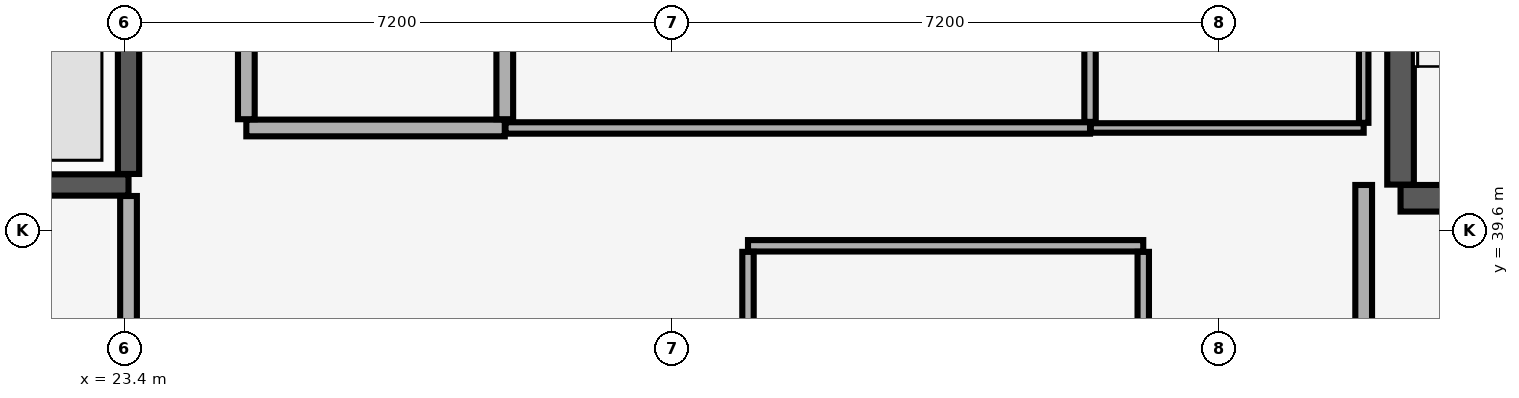
"""IFC4 building model, lengths in metres.
Left out: names, types, materials, properties, quantities, classifications, styles, units other than length and angle.
Written with IfcOpenShell. Run it as: python <this file> out.ifc"""

import sys

from ifc_helpers import new_model, si_unit, direction, frame, frame_2d, origin, place, context, subcontext, project, spatial, rectangle, extrude, element, fill, save


model = new_model("IFC4")
c1 = context("Model", 3, precision=1e-05, world=origin(), true_north=direction((0.0, 1.0)))
c2 = subcontext(c1, "Body", "Model", "MODEL_VIEW")
j1 = project(units=[si_unit("LENGTHUNIT", "METRE"), si_unit("PLANEANGLEUNIT", "RADIAN")], contexts=[c1])
p1 = place(None, origin())
s1 = spatial("IfcSite", under=j1, at=p1, CompositionType="ELEMENT")
p2 = place(p1, origin())
s2 = spatial("IfcBuilding", under=s1, at=p2, CompositionType="ELEMENT")
p3 = place(p2, frame((0.0, 0.0, 224.35)))
s3 = spatial("IfcBuildingStorey", under=s2, at=p3, CompositionType="ELEMENT", Elevation=224.35)
p4 = place(p3, frame((40.185, 40.025, 0.0), z_axis=(0.0, 0.0, 1.0), x_axis=(1.0, 0.0, 0.0)))
e1 = element("IfcWall", 1, at=p4, inside=s3, PredefinedType="SHEAR", context=c2, shape_type="SweptSolid", body=[
    extrude(rectangle(XDim=3.63, YDim=0.35, at=frame_2d((1.815, 0.0))), origin(), (0.0, 0.0, 1.0), 4.52),
])
p5 = place(p4, frame((1.24, 0.0, 0.0)))
e2 = element("IfcOpeningElement", 2, at=p5, cuts=e1, PredefinedType="OPENING", context=c2, shape_type="SweptSolid", body=[
    extrude(rectangle(XDim=1.15, YDim=2.15, at=frame_2d((0.575, 1.075))), frame((0.0, 0.185, 0.0), z_axis=(0.0, -1.0, 0.0), x_axis=(1.0, 0.0, 0.0)), (0.0, 0.0, 1.0), 0.37),
])
p6 = place(p3, frame((40.185, 40.205, 0.0), z_axis=(0.0, 0.0, 1.0), x_axis=(0.0, 1.0, 0.0)))
e3 = element("IfcWall", 3, at=p6, inside=s3, PredefinedType="SHEAR", context=c2, shape_type="SweptSolid", body=[
    extrude(rectangle(XDim=8.09, YDim=0.35, at=frame_2d((4.045, 0.0))), origin(), (0.0, 0.0, 1.0), 4.52),
])
p7 = place(p3, frame((21.035, 40.2, 0.0), z_axis=(0.0, 0.0, 1.0), x_axis=(1.0, 0.0, 0.0)))
e4 = element("IfcWall", 4, at=p7, inside=s3, PredefinedType="SHEAR", context=c2, shape_type="SweptSolid", body=[
    extrude(rectangle(XDim=2.415, YDim=0.28, at=frame_2d((1.208, 0.0))), origin(), (0.0, 0.0, 1.0), 4.52),
])
p8 = place(p7, frame((0.54, 0.0, 0.0)))
e5 = element("IfcOpeningElement", 5, at=p8, cuts=e4, PredefinedType="OPENING", context=c2, shape_type="SweptSolid", body=[
    extrude(rectangle(XDim=1.3, YDim=2.3, at=frame_2d((0.65, 1.15))), frame((0.0, 0.15, 0.0), z_axis=(0.0, -1.0, 0.0), x_axis=(1.0, 0.0, 0.0)), (0.0, 0.0, 1.0), 0.3),
])
p9 = place(p3, frame((23.45, 40.345, 0.0), z_axis=(0.0, 0.0, 1.0), x_axis=(0.0, 1.0, 0.0)))
e6 = element("IfcWall", 6, at=p9, inside=s3, PredefinedType="SHEAR", context=c2, shape_type="SweptSolid", body=[
    extrude(rectangle(XDim=2.81, YDim=0.28, at=frame_2d((1.405, 0.0))), origin(), (0.0, 0.0, 1.0), 4.52),
])
p10 = place(p3, frame((23.45, 34.415, 0.0), z_axis=(0.0, 0.0, 1.0), x_axis=(0.0, 1.0, 0.0)))
e7 = element("IfcWall", 7, at=p10, inside=s3, PredefinedType="PARTITIONING", context=c2, shape_type="SweptSolid", body=[
    extrude(rectangle(XDim=5.64, YDim=0.22, at=frame_2d((2.82, 0.0))), origin(), (0.0, 0.0, 1.0), 4.52),
])
p11 = place(p3, frame((39.7, 34.415, 0.0), z_axis=(0.0, 0.0, 1.0), x_axis=(0.0, 1.0, 0.0)))
e8 = element("IfcWall", 8, at=p11, inside=s3, PredefinedType="PARTITIONING", context=c2, shape_type="SweptSolid", body=[
    extrude(rectangle(XDim=5.785, YDim=0.22, at=frame_2d((2.893, 0.0))), origin(), (0.0, 0.0, 1.0), 4.52),
])
p12 = place(p3, frame((31.6, 39.4, 0.0), z_axis=(0.0, 0.0, 1.0), x_axis=(1.0, 0.0, 0.0)))
e9 = element("IfcWall", 9, at=p12, inside=s3, PredefinedType="PARTITIONING", context=c2, shape_type="SweptSolid", body=[
    extrude(rectangle(XDim=5.2, YDim=0.15, at=frame_2d((2.6, 0.0))), origin(), (0.0, 0.0, 1.0), 4.52),
])
for number, where, z_axis, x_axis in (
    (10, (31.6, 34.38, 0.0), (0.0, 0.0, 1.0), (0.0, 1.0, 0.0)),
    (11, (36.8, 34.38, 0.0), (0.0, 0.0, 1.0), (0.0, 1.0, 0.0)),
):
    element("IfcWall", number, at=place(p3, frame(where, z_axis=z_axis, x_axis=x_axis)), inside=s3, PredefinedType="PARTITIONING", context=c2, shape_type="SweptSolid", body=[
        extrude(rectangle(XDim=4.94, YDim=0.15, at=frame_2d((2.47, 0.0))), origin(), (0.0, 0.0, 1.0), 4.52),
    ])
p13 = place(p3, frame((25.0, 40.95, 0.0), z_axis=(0.0, 0.0, 1.0), x_axis=(1.0, 0.0, 0.0)))
e12 = element("IfcWall", 12, at=p13, inside=s3, PredefinedType="PARTITIONING", context=c2, shape_type="SweptSolid", body=[
    extrude(rectangle(XDim=3.4, YDim=0.22, at=frame_2d((1.7, 0.0))), origin(), (0.0, 0.0, 1.0), 4.52),
])
p14 = place(p13, frame((1.275, 0.0, 0.0)))
e13 = element("IfcOpeningElement", 13, at=p14, cuts=e12, PredefinedType="OPENING", context=c2, shape_type="SweptSolid", body=[
    extrude(rectangle(XDim=0.85, YDim=2.1, at=frame_2d((0.425, 1.05))), frame((0.0, 0.12, 0.0), z_axis=(0.0, -1.0, 0.0), x_axis=(1.0, 0.0, 0.0)), (0.0, 0.0, 1.0), 0.24),
])
for number, where, z_axis, x_axis in (
    (14, (25.0, 41.065, 0.0), (0.0, 0.0, 1.0), (0.0, 1.0, 0.0)),
    (15, (28.4, 41.065, 0.0), (0.0, 0.0, 1.0), (0.0, 1.0, 0.0)),
):
    element("IfcWall", number, at=place(p3, frame(where, z_axis=z_axis, x_axis=x_axis)), inside=s3, PredefinedType="PARTITIONING", context=c2, shape_type="SweptSolid", body=[
        extrude(rectangle(XDim=7.785, YDim=0.22, at=frame_2d((3.893, 0.0))), origin(), (0.0, 0.0, 1.0), 4.52),
    ])
p15 = place(p3, frame((28.41, 40.95, 0.0), z_axis=(0.0, 0.0, 1.0), x_axis=(1.0, 0.0, 0.0)))
e16 = element("IfcWall", 16, at=p15, inside=s3, PredefinedType="PARTITIONING", context=c2, shape_type="SweptSolid", body=[
    extrude(rectangle(XDim=7.69, YDim=0.15, at=frame_2d((3.845, 0.0))), origin(), (0.0, 0.0, 1.0), 4.52),
])
p16 = place(p15, frame((3.415, 0.0, 0.0)))
e17 = element("IfcOpeningElement", 17, at=p16, cuts=e16, PredefinedType="OPENING", context=c2, shape_type="SweptSolid", body=[
    extrude(rectangle(XDim=0.85, YDim=2.1, at=frame_2d((0.425, 1.05))), frame((0.0, 0.085, 0.0), z_axis=(0.0, -1.0, 0.0), x_axis=(1.0, 0.0, 0.0)), (0.0, 0.0, 1.0), 0.17),
])
p17 = place(p3, frame((36.1, 41.03, 0.0), z_axis=(0.0, 0.0, 1.0), x_axis=(0.0, 1.0, 0.0)))
e18 = element("IfcWall", 18, at=p17, inside=s3, PredefinedType="PARTITIONING", context=c2, shape_type="SweptSolid", body=[
    extrude(rectangle(XDim=7.82, YDim=0.15, at=frame_2d((3.91, 0.0))), origin(), (0.0, 0.0, 1.0), 4.52),
])
p18 = place(p3, frame((36.11, 40.95, 0.0), z_axis=(0.0, 0.0, 1.0), x_axis=(1.0, 0.0, 0.0)))
e19 = element("IfcWall", 19, at=p18, inside=s3, PredefinedType="PARTITIONING", context=c2, shape_type="SweptSolid", body=[
    extrude(rectangle(XDim=3.59, YDim=0.125, at=frame_2d((1.795, 0.0))), origin(), (0.0, 0.0, 1.0), 4.52),
])
p19 = place(p18, frame((1.34, 0.0, 0.0)))
e20 = element("IfcOpeningElement", 20, at=p19, cuts=e19, PredefinedType="OPENING", context=c2, shape_type="SweptSolid", body=[
    extrude(rectangle(XDim=0.9, YDim=2.1, at=frame_2d((0.45, 1.05))), frame((0.0, 0.073, 0.0), z_axis=(0.0, -1.0, 0.0), x_axis=(1.0, 0.0, 0.0)), (0.0, 0.0, 1.0), 0.145),
])
p20 = place(p3, frame((39.7, 41.018, 0.0), z_axis=(0.0, 0.0, 1.0), x_axis=(0.0, 1.0, 0.0)))
e21 = element("IfcWall", 21, at=p20, inside=s3, PredefinedType="PARTITIONING", context=c2, shape_type="SweptSolid", body=[
    extrude(rectangle(XDim=3.715, YDim=0.125, at=frame_2d((1.857, 0.0))), origin(), (0.0, 0.0, 1.0), 4.52),
])
p21 = place(p8, origin())
e22 = element("IfcDoor", 22, at=p21, inside=s3, OperationType="DOUBLE_DOOR_SLIDING", PredefinedType="DOOR", context=c2, shape_type="SweptSolid", body=[
    extrude(rectangle(XDim=1.3, YDim=2.3, at=frame_2d((0.65, 1.15))), frame((0.0, 0.025, 0.0), z_axis=(0.0, -1.0, 0.0), x_axis=(1.0, 0.0, 0.0)), (0.0, 0.0, 1.0), 0.05),
])
fill(e5, e22)
p22 = place(p14, origin())
e23 = element("IfcDoor", 23, at=p22, inside=s3, OperationType="SINGLE_SWING_RIGHT", PredefinedType="DOOR", context=c2, shape_type="SweptSolid", body=[
    extrude(rectangle(XDim=0.85, YDim=2.1, at=frame_2d((0.425, 1.05))), frame((0.0, 0.025, 0.0), z_axis=(0.0, -1.0, 0.0), x_axis=(1.0, 0.0, 0.0)), (0.0, 0.0, 1.0), 0.05),
])
fill(e13, e23)
p23 = place(p16, origin())
e24 = element("IfcDoor", 24, at=p23, inside=s3, OperationType="SINGLE_SWING_LEFT", PredefinedType="DOOR", context=c2, shape_type="SweptSolid", body=[
    extrude(rectangle(XDim=0.85, YDim=2.1, at=frame_2d((0.425, 1.05))), frame((0.0, 0.025, 0.0), z_axis=(0.0, -1.0, 0.0), x_axis=(1.0, 0.0, 0.0)), (0.0, 0.0, 1.0), 0.05),
])
fill(e17, e24)
p24 = place(p19, origin())
e25 = element("IfcDoor", 25, at=p24, inside=s3, OperationType="SINGLE_SWING_RIGHT", PredefinedType="DOOR", context=c2, shape_type="SweptSolid", body=[
    extrude(rectangle(XDim=0.9, YDim=2.1, at=frame_2d((0.45, 1.05))), frame((0.0, 0.025, 0.0), z_axis=(0.0, -1.0, 0.0), x_axis=(1.0, 0.0, 0.0)), (0.0, 0.0, 1.0), 0.05),
])
fill(e20, e25)
save(model, sys.argv[1])
